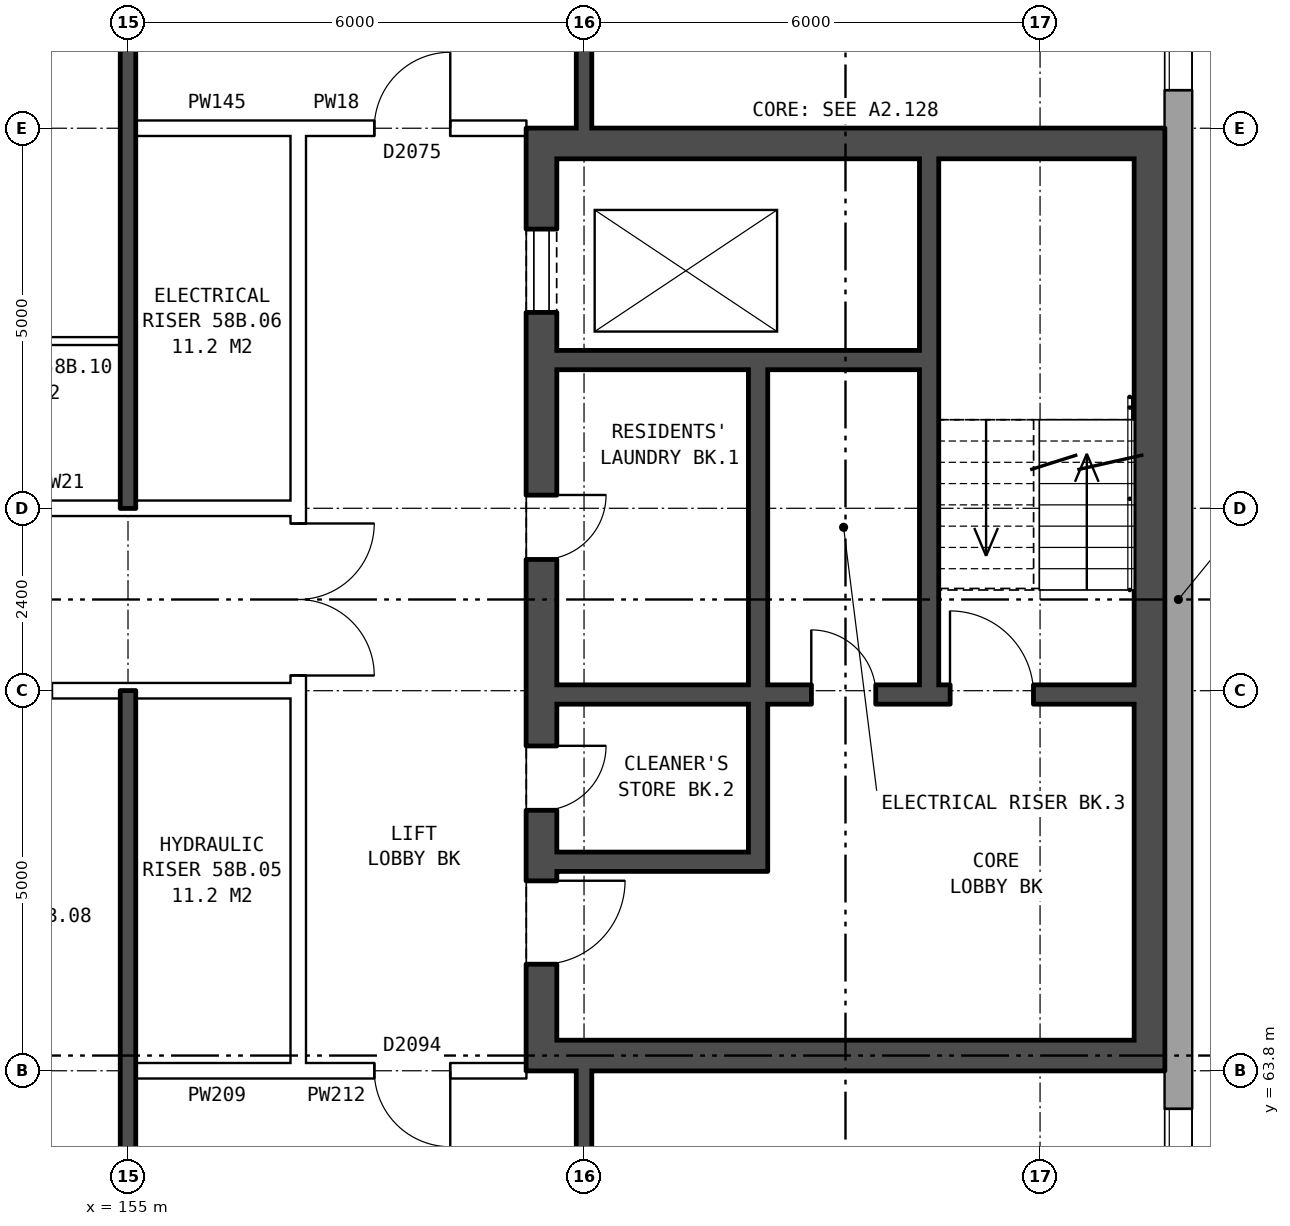
"""IFC4 building model, lengths in metres.
Left out: names, types, materials, properties, quantities, classifications, styles, units other than length and angle.
Written with IfcOpenShell. Run it as: python <this file> out.ifc"""

import sys

from ifc_helpers import new_model, si_unit, direction, frame, frame_2d, origin, place, context, subcontext, project, spatial, rectangle, extrude, element, fill, save


model = new_model("IFC4")
c1 = context("Model", 3, precision=1e-05, world=origin(), true_north=direction((0.0, 1.0)))
c2 = subcontext(c1, "Body", "Model", "MODEL_VIEW")
j1 = project(units=[si_unit("LENGTHUNIT", "METRE"), si_unit("PLANEANGLEUNIT", "RADIAN")], contexts=[c1])
p1 = place(None, origin())
s1 = spatial("IfcSite", under=j1, at=p1, CompositionType="ELEMENT")
p2 = place(p1, origin())
s2 = spatial("IfcBuilding", under=s1, at=p2, CompositionType="ELEMENT")
p3 = place(p2, frame((0.0, 0.0, 205.9)))
s3 = spatial("IfcBuildingStorey", under=s2, at=p3, CompositionType="ELEMENT", Elevation=205.9)
p4 = place(p3, frame((168.82, 57.075, 0.0), z_axis=(0.0, 0.0, 1.0), x_axis=(0.0, 1.0, 0.0)))
e1 = element("IfcWall", 1, at=p4, inside=s3, PredefinedType="STANDARD", context=c2, shape_type="SweptSolid", body=[
    extrude(rectangle(XDim=25.851, YDim=0.36, at=frame_2d((12.925, 0.0))), origin(), (0.0, 0.0, 1.0), 2.85),
])
p5 = place(p4, frame((2.225, 0.0, 0.8)))
e2 = element("IfcOpeningElement", 2, at=p5, cuts=e1, PredefinedType="OPENING", context=c2, shape_type="SweptSolid", body=[
    extrude(rectangle(XDim=0.6, YDim=0.9, at=frame_2d((0.3, 0.45))), frame((0.0, 0.19, 0.0), z_axis=(0.0, -1.0, 0.0), x_axis=(1.0, 0.0, 0.0)), (0.0, 0.0, 1.0), 0.38),
])
p6 = place(p4, frame((4.625, 0.0, 0.8)))
e3 = element("IfcOpeningElement", 3, at=p6, cuts=e1, PredefinedType="OPENING", context=c2, shape_type="SweptSolid", body=[
    extrude(rectangle(XDim=1.6, YDim=1.8, at=frame_2d((0.8, 0.9))), frame((0.0, 0.19, 0.0), z_axis=(0.0, -1.0, 0.0), x_axis=(1.0, 0.0, 0.0)), (0.0, 0.0, 1.0), 0.38),
])
p7 = place(p4, frame((19.625, 0.0, 0.8)))
e4 = element("IfcOpeningElement", 4, at=p7, cuts=e1, PredefinedType="OPENING", context=c2, shape_type="SweptSolid", body=[
    extrude(rectangle(XDim=1.6, YDim=1.8, at=frame_2d((0.8, 0.9))), frame((0.0, 0.19, 0.0), z_axis=(0.0, -1.0, 0.0), x_axis=(1.0, 0.0, 0.0)), (0.0, 0.0, 1.0), 0.38),
])
p8 = place(p4, frame((21.525, 0.0, 0.8)))
e5 = element("IfcOpeningElement", 5, at=p8, cuts=e1, PredefinedType="OPENING", context=c2, shape_type="SweptSolid", body=[
    extrude(rectangle(XDim=1.2, YDim=1.8, at=frame_2d((0.6, 0.9))), frame((0.0, 0.19, 0.0), z_axis=(0.0, -1.0, 0.0), x_axis=(1.0, 0.0, 0.0)), (0.0, 0.0, 1.0), 0.38),
])
p9 = place(p4, frame((3.125, 0.0, 0.8)))
e6 = element("IfcOpeningElement", 6, at=p9, cuts=e1, PredefinedType="OPENING", context=c2, shape_type="SweptSolid", body=[
    extrude(rectangle(XDim=1.2, YDim=1.8, at=frame_2d((0.6, 0.9))), frame((0.0, 0.19, 0.0), z_axis=(0.0, -1.0, 0.0), x_axis=(1.0, 0.0, 0.0)), (0.0, 0.0, 1.0), 0.38),
])
p10 = place(p4, frame((23.025, 0.0, 0.8)))
e7 = element("IfcOpeningElement", 7, at=p10, cuts=e1, PredefinedType="OPENING", context=c2, shape_type="SweptSolid", body=[
    extrude(rectangle(XDim=0.6, YDim=0.9, at=frame_2d((0.3, 0.45))), frame((0.0, 0.19, 0.0), z_axis=(0.0, -1.0, 0.0), x_axis=(1.0, 0.0, 0.0)), (0.0, 0.0, 1.0), 0.38),
])
p11 = place(p3, frame((160.44, 76.2, 0.0), z_axis=(0.0, 0.0, 1.0), x_axis=(0.0, -1.0, 0.0)))
e8 = element("IfcWall", 8, at=p11, inside=s3, PredefinedType="SHEAR", context=c2, shape_type="SweptSolid", body=[
    extrude(rectangle(XDim=12.4, YDim=0.4, at=frame_2d((6.2, 0.0))), origin(), (0.0, 0.0, 1.0), 2.85),
])
p12 = place(p11, frame((1.325, 0.0, 0.0)))
e9 = element("IfcOpeningElement", 9, at=p12, cuts=e8, PredefinedType="OPENING", context=c2, shape_type="SweptSolid", body=[
    extrude(rectangle(XDim=1.1, YDim=2.1, at=frame_2d((0.55, 1.05))), frame((0.0, 0.21, 0.0), z_axis=(0.0, -1.0, 0.0), x_axis=(1.0, 0.0, 0.0)), (0.0, 0.0, 1.0), 0.42),
])
p13 = place(p11, frame((4.825, 0.0, 0.0)))
e10 = element("IfcOpeningElement", 10, at=p13, cuts=e8, PredefinedType="OPENING", context=c2, shape_type="SweptSolid", body=[
    extrude(rectangle(XDim=0.85, YDim=2.1, at=frame_2d((0.425, 1.05))), frame((0.0, 0.21, 0.0), z_axis=(0.0, -1.0, 0.0), x_axis=(1.0, 0.0, 0.0)), (0.0, 0.0, 1.0), 0.42),
])
p14 = place(p11, frame((9.9, 0.0, 0.0)))
e11 = element("IfcOpeningElement", 11, at=p14, cuts=e8, PredefinedType="OPENING", context=c2, shape_type="SweptSolid", body=[
    extrude(rectangle(XDim=1.1, YDim=2.1, at=frame_2d((0.55, 1.05))), frame((0.0, 0.21, 0.0), z_axis=(0.0, -1.0, 0.0), x_axis=(1.0, 0.0, 0.0)), (0.0, 0.0, 1.0), 0.42),
])
p15 = place(p11, frame((8.125, 0.0, 0.0)))
e12 = element("IfcOpeningElement", 12, at=p15, cuts=e8, PredefinedType="OPENING", context=c2, shape_type="SweptSolid", body=[
    extrude(rectangle(XDim=0.85, YDim=2.1, at=frame_2d((0.425, 1.05))), frame((0.0, 0.21, 0.0), z_axis=(0.0, -1.0, 0.0), x_axis=(1.0, 0.0, 0.0)), (0.0, 0.0, 1.0), 0.42),
])
p16 = place(p3, frame((168.44, 76.2, 0.0), z_axis=(0.0, 0.0, 1.0), x_axis=(0.0, -1.0, 0.0)))
e13 = element("IfcWall", 13, at=p16, inside=s3, PredefinedType="SHEAR", context=c2, shape_type="SweptSolid", body=[
    extrude(rectangle(XDim=12.4, YDim=0.4, at=frame_2d((6.2, 0.0))), origin(), (0.0, 0.0, 1.0), 2.85),
])
for number, where, z_axis, x_axis in (
    (14, (160.64, 76.0, 0.0), (0.0, 0.0, 1.0), (1.0, 0.0, 0.0)),
    (15, (160.64, 64.0, 0.0), (0.0, 0.0, 1.0), (1.0, 0.0, 0.0)),
):
    element("IfcWall", number, at=place(p3, frame(where, z_axis=z_axis, x_axis=x_axis)), inside=s3, PredefinedType="SHEAR", context=c2, shape_type="SweptSolid", body=[
        extrude(rectangle(XDim=7.6, YDim=0.4, at=frame_2d((3.8, 0.0))), origin(), (0.0, 0.0, 1.0), 2.85),
    ])
p17 = place(p3, frame((160.64, 73.15, 0.0), z_axis=(0.0, 0.0, 1.0), x_axis=(1.0, 0.0, 0.0)))
e16 = element("IfcWall", 16, at=p17, inside=s3, PredefinedType="SHEAR", context=c2, shape_type="SweptSolid", body=[
    extrude(rectangle(XDim=4.775, YDim=0.25, at=frame_2d((2.388, 0.0))), origin(), (0.0, 0.0, 1.0), 2.85),
])
p18 = place(p3, frame((160.64, 68.75, 0.0), z_axis=(0.0, 0.0, 1.0), x_axis=(1.0, 0.0, 0.0)))
e17 = element("IfcWall", 17, at=p18, inside=s3, PredefinedType="SHEAR", context=c2, shape_type="SweptSolid", body=[
    extrude(rectangle(XDim=7.6, YDim=0.25, at=frame_2d((3.8, 0.0))), origin(), (0.0, 0.0, 1.0), 2.85),
])
p19 = place(p18, frame((5.175, 0.0, 0.0)))
e18 = element("IfcOpeningElement", 18, at=p19, cuts=e17, PredefinedType="OPENING", context=c2, shape_type="SweptSolid", body=[
    extrude(rectangle(XDim=1.1, YDim=2.1, at=frame_2d((0.55, 1.05))), frame((0.0, 0.135, 0.0), z_axis=(0.0, -1.0, 0.0), x_axis=(1.0, 0.0, 0.0)), (0.0, 0.0, 1.0), 0.27),
])
p20 = place(p18, frame((3.35, 0.0, 0.0)))
e19 = element("IfcOpeningElement", 19, at=p20, cuts=e17, PredefinedType="OPENING", context=c2, shape_type="SweptSolid", body=[
    extrude(rectangle(XDim=0.85, YDim=2.1, at=frame_2d((0.425, 1.05))), frame((0.0, 0.135, 0.0), z_axis=(0.0, -1.0, 0.0), x_axis=(1.0, 0.0, 0.0)), (0.0, 0.0, 1.0), 0.27),
])
p21 = place(p3, frame((160.64, 66.55, 0.0), z_axis=(0.0, 0.0, 1.0), x_axis=(1.0, 0.0, 0.0)))
e20 = element("IfcWall", 20, at=p21, inside=s3, PredefinedType="SHEAR", context=c2, shape_type="SweptSolid", body=[
    extrude(rectangle(XDim=2.525, YDim=0.25, at=frame_2d((1.263, 0.0))), origin(), (0.0, 0.0, 1.0), 2.85),
])
p22 = place(p3, frame((163.29, 73.025, 0.0), z_axis=(0.0, 0.0, 1.0), x_axis=(0.0, -1.0, 0.0)))
e21 = element("IfcWall", 21, at=p22, inside=s3, PredefinedType="SHEAR", context=c2, shape_type="SweptSolid", body=[
    extrude(rectangle(XDim=4.15, YDim=0.25, at=frame_2d((2.075, 0.0))), origin(), (0.0, 0.0, 1.0), 2.85),
])
p23 = place(p3, frame((163.29, 68.625, 0.0), z_axis=(0.0, 0.0, 1.0), x_axis=(0.0, -1.0, 0.0)))
e22 = element("IfcWall", 22, at=p23, inside=s3, PredefinedType="SHEAR", context=c2, shape_type="SweptSolid", body=[
    extrude(rectangle(XDim=2.2, YDim=0.25, at=frame_2d((1.1, 0.0))), origin(), (0.0, 0.0, 1.0), 2.85),
])
p24 = place(p3, frame((165.54, 75.8, 0.0), z_axis=(0.0, 0.0, 1.0), x_axis=(0.0, -1.0, 0.0)))
e23 = element("IfcWall", 23, at=p24, inside=s3, PredefinedType="SHEAR", context=c2, shape_type="SweptSolid", body=[
    extrude(rectangle(XDim=6.925, YDim=0.25, at=frame_2d((3.462, 0.0))), origin(), (0.0, 0.0, 1.0), 2.85),
])
p25 = place(p3, frame((157.24, 63.9, 0.0), z_axis=(0.0, 0.0, 1.0), x_axis=(0.0, 1.0, 0.0)))
e24 = element("IfcWall", 24, at=p25, inside=s3, PredefinedType="PARTITIONING", context=c2, shape_type="SweptSolid", body=[
    extrude(rectangle(XDim=12.2, YDim=0.2, at=frame_2d((6.1, 0.0))), origin(), (0.0, 0.0, 1.0), 2.85),
])
p26 = place(p25, frame((5.1, 0.0, 0.0)))
e25 = element("IfcOpeningElement", 25, at=p26, cuts=e24, PredefinedType="OPENING", context=c2, shape_type="SweptSolid", body=[
    extrude(rectangle(XDim=2.0, YDim=2.1, at=frame_2d((1.0, 1.05))), frame((0.0, 0.11, 0.0), z_axis=(0.0, -1.0, 0.0), x_axis=(1.0, 0.0, 0.0)), (0.0, 0.0, 1.0), 0.22),
])
p27 = place(p3, frame((155.1, 63.8, 0.0), z_axis=(0.0, 0.0, 1.0), x_axis=(1.0, 0.0, 0.0)))
e26 = element("IfcWall", 26, at=p27, inside=s3, PredefinedType="PARTITIONING", context=c2, shape_type="SweptSolid", body=[
    extrude(rectangle(XDim=2.14, YDim=0.2, at=frame_2d((1.07, 0.0))), origin(), (0.0, 0.0, 1.0), 2.85),
])
p28 = place(p3, frame((157.24, 63.8, 0.0), z_axis=(0.0, 0.0, 1.0), x_axis=(1.0, 0.0, 0.0)))
e27 = element("IfcWall", 27, at=p28, inside=s3, PredefinedType="PARTITIONING", context=c2, shape_type="SweptSolid", body=[
    extrude(rectangle(XDim=3.0, YDim=0.2, at=frame_2d((1.5, 0.0))), origin(), (0.0, 0.0, 1.0), 2.85),
])
p29 = place(p28, frame((1.0, 0.0, 0.0)))
e28 = element("IfcOpeningElement", 28, at=p29, cuts=e27, PredefinedType="OPENING", context=c2, shape_type="SweptSolid", body=[
    extrude(rectangle(XDim=1.0, YDim=2.1, at=frame_2d((0.5, 1.05))), frame((0.0, 0.11, 0.0), z_axis=(0.0, -1.0, 0.0), x_axis=(1.0, 0.0, 0.0)), (0.0, 0.0, 1.0), 0.22),
])
p30 = place(p3, frame((142.76, 68.8, 0.0), z_axis=(0.0, 0.0, 1.0), x_axis=(1.0, 0.0, 0.0)))
e29 = element("IfcWall", 29, at=p30, inside=s3, PredefinedType="PARTITIONING", context=c2, shape_type="SweptSolid", body=[
    extrude(rectangle(XDim=14.48, YDim=0.2, at=frame_2d((7.24, 0.0))), origin(), (0.0, 0.0, 1.0), 2.85),
])
p31 = place(p30, frame((1.12, 0.0, 0.0)))
e30 = element("IfcOpeningElement", 30, at=p31, cuts=e29, PredefinedType="OPENING", context=c2, shape_type="SweptSolid", body=[
    extrude(rectangle(XDim=1.0, YDim=2.1, at=frame_2d((0.5, 1.05))), frame((0.0, 0.11, 0.0), z_axis=(0.0, -1.0, 0.0), x_axis=(1.0, 0.0, 0.0)), (0.0, 0.0, 1.0), 0.22),
])
p32 = place(p30, frame((10.24, 0.0, 0.0)))
e31 = element("IfcOpeningElement", 31, at=p32, cuts=e29, PredefinedType="OPENING", context=c2, shape_type="SweptSolid", body=[
    extrude(rectangle(XDim=1.0, YDim=2.1, at=frame_2d((0.5, 1.05))), frame((0.0, 0.11, 0.0), z_axis=(0.0, -1.0, 0.0), x_axis=(1.0, 0.0, 0.0)), (0.0, 0.0, 1.0), 0.22),
])
p33 = place(p3, frame((142.76, 71.2, 0.0), z_axis=(0.0, 0.0, 1.0), x_axis=(1.0, 0.0, 0.0)))
e32 = element("IfcWall", 32, at=p33, inside=s3, PredefinedType="PARTITIONING", context=c2, shape_type="SweptSolid", body=[
    extrude(rectangle(XDim=14.48, YDim=0.2, at=frame_2d((7.24, 0.0))), origin(), (0.0, 0.0, 1.0), 2.85),
])
p34 = place(p33, frame((1.12, 0.0, 0.0)))
e33 = element("IfcOpeningElement", 33, at=p34, cuts=e32, PredefinedType="OPENING", context=c2, shape_type="SweptSolid", body=[
    extrude(rectangle(XDim=1.0, YDim=2.1, at=frame_2d((0.5, 1.05))), frame((0.0, 0.11, 0.0), z_axis=(0.0, -1.0, 0.0), x_axis=(1.0, 0.0, 0.0)), (0.0, 0.0, 1.0), 0.22),
])
p35 = place(p33, frame((7.24, 0.0, 0.0)))
e34 = element("IfcOpeningElement", 34, at=p35, cuts=e32, PredefinedType="OPENING", context=c2, shape_type="SweptSolid", body=[
    extrude(rectangle(XDim=1.0, YDim=2.1, at=frame_2d((0.5, 1.05))), frame((0.0, 0.11, 0.0), z_axis=(0.0, -1.0, 0.0), x_axis=(1.0, 0.0, 0.0)), (0.0, 0.0, 1.0), 0.22),
])
p36 = place(p3, frame((152.0, 73.4, 0.0), z_axis=(0.0, 0.0, 1.0), x_axis=(1.0, 0.0, 0.0)))
e35 = element("IfcWall", 35, at=p36, inside=s3, PredefinedType="PARTITIONING", context=c2, shape_type="SweptSolid", body=[
    extrude(rectangle(XDim=2.9, YDim=0.1, at=frame_2d((1.45, 0.0))), origin(), (0.0, 0.0, 1.0), 2.85),
])
p37 = place(p3, frame((155.1, 76.2, 0.0), z_axis=(0.0, 0.0, 1.0), x_axis=(1.0, 0.0, 0.0)))
e36 = element("IfcWall", 36, at=p37, inside=s3, PredefinedType="PARTITIONING", context=c2, shape_type="SweptSolid", body=[
    extrude(rectangle(XDim=2.14, YDim=0.2, at=frame_2d((1.07, 0.0))), origin(), (0.0, 0.0, 1.0), 2.85),
])
p38 = place(p3, frame((157.24, 76.2, 0.0), z_axis=(0.0, 0.0, 1.0), x_axis=(1.0, 0.0, 0.0)))
e37 = element("IfcWall", 37, at=p38, inside=s3, PredefinedType="PARTITIONING", context=c2, shape_type="SweptSolid", body=[
    extrude(rectangle(XDim=3.0, YDim=0.2, at=frame_2d((1.5, 0.0))), origin(), (0.0, 0.0, 1.0), 2.85),
])
p39 = place(p38, frame((1.0, 0.0, 0.0)))
e38 = element("IfcOpeningElement", 38, at=p39, cuts=e37, PredefinedType="OPENING", context=c2, shape_type="SweptSolid", body=[
    extrude(rectangle(XDim=1.0, YDim=2.1, at=frame_2d((0.5, 1.05))), frame((0.0, 0.11, 0.0), z_axis=(0.0, -1.0, 0.0), x_axis=(1.0, 0.0, 0.0)), (0.0, 0.0, 1.0), 0.22),
])
for number, where, z_axis, x_axis in (
    (39, (155.0, 54.36, 0.0), (0.0, 0.0, 1.0), (0.0, 1.0, 0.0)),
    (40, (155.0, 71.2, 0.0), (0.0, 0.0, 1.0), (0.0, 1.0, 0.0)),
):
    element("IfcWall", number, at=place(p3, frame(where, z_axis=z_axis, x_axis=x_axis)), inside=s3, PredefinedType="SOLIDWALL", context=c2, shape_type="SweptSolid", body=[
        extrude(rectangle(XDim=14.44, YDim=0.2, at=frame_2d((7.22, 0.0))), origin(), (0.0, 0.0, 1.0), 2.85),
    ])
p40 = place(p3, frame((161.0, 54.36, 0.0), z_axis=(0.0, 0.0, 1.0), x_axis=(0.0, 1.0, 0.0)))
e41 = element("IfcWall", 41, at=p40, inside=s3, PredefinedType="SOLIDWALL", context=c2, shape_type="SweptSolid", body=[
    extrude(rectangle(XDim=9.44, YDim=0.2, at=frame_2d((4.72, 0.0))), origin(), (0.0, 0.0, 1.0), 2.85),
])
p41 = place(p40, frame((7.19, 0.0, 0.0)))
e42 = element("IfcOpeningElement", 42, at=p41, cuts=e41, PredefinedType="OPENING", context=c2, shape_type="SweptSolid", body=[
    extrude(rectangle(XDim=0.9, YDim=2.1, at=frame_2d((0.45, 1.05))), frame((0.0, 0.11, 0.0), z_axis=(0.0, -1.0, 0.0), x_axis=(1.0, 0.0, 0.0)), (0.0, 0.0, 1.0), 0.22),
])
p42 = place(p3, frame((161.0, 76.2, 0.0), z_axis=(0.0, 0.0, 1.0), x_axis=(0.0, 1.0, 0.0)))
e43 = element("IfcWall", 43, at=p42, inside=s3, PredefinedType="SOLIDWALL", context=c2, shape_type="SweptSolid", body=[
    extrude(rectangle(XDim=9.44, YDim=0.2, at=frame_2d((4.72, 0.0))), origin(), (0.0, 0.0, 1.0), 2.85),
])
p43 = place(p42, frame((1.35, 0.0, 0.0)))
e44 = element("IfcOpeningElement", 44, at=p43, cuts=e43, PredefinedType="OPENING", context=c2, shape_type="SweptSolid", body=[
    extrude(rectangle(XDim=0.9, YDim=2.1, at=frame_2d((0.45, 1.05))), frame((0.0, 0.11, 0.0), z_axis=(0.0, -1.0, 0.0), x_axis=(1.0, 0.0, 0.0)), (0.0, 0.0, 1.0), 0.22),
])
p44 = place(p6, origin())
e45 = element("IfcWindow", 45, at=p44, inside=s3, PartitioningType="SINGLE_PANEL", PredefinedType="WINDOW", context=c2, shape_type="SweptSolid", body=[
    extrude(rectangle(XDim=1.6, YDim=1.8, at=frame_2d((0.8, 0.9))), frame((0.0, 0.15, 0.0), z_axis=(0.0, -1.0, 0.0), x_axis=(1.0, 0.0, 0.0)), (0.0, 0.0, 1.0), 0.06),
])
fill(e3, e45)
p45 = place(p7, origin())
e46 = element("IfcWindow", 46, at=p45, inside=s3, PartitioningType="SINGLE_PANEL", PredefinedType="WINDOW", context=c2, shape_type="SweptSolid", body=[
    extrude(rectangle(XDim=1.6, YDim=1.8, at=frame_2d((0.8, 0.9))), frame((0.0, 0.15, 0.0), z_axis=(0.0, -1.0, 0.0), x_axis=(1.0, 0.0, 0.0)), (0.0, 0.0, 1.0), 0.06),
])
fill(e4, e46)
p46 = place(p12, origin())
e47 = element("IfcDoor", 47, at=p46, inside=s3, OperationType="DOUBLE_DOOR_SLIDING", PredefinedType="DOOR", context=c2, shape_type="SweptSolid", body=[
    extrude(rectangle(XDim=1.1, YDim=2.1, at=frame_2d((0.55, 1.05))), frame((0.0, 0.185, 0.0), z_axis=(0.0, -1.0, 0.0), x_axis=(1.0, 0.0, 0.0)), (0.0, 0.0, 1.0), 0.05),
])
fill(e9, e47)
p47 = place(p13, origin())
e48 = element("IfcDoor", 48, at=p47, inside=s3, OperationType="SINGLE_SWING_LEFT", PredefinedType="DOOR", context=c2, shape_type="SweptSolid", body=[
    extrude(rectangle(XDim=0.85, YDim=2.1, at=frame_2d((0.425, 1.05))), frame((0.0, 0.185, 0.0), z_axis=(0.0, -1.0, 0.0), x_axis=(1.0, 0.0, 0.0)), (0.0, 0.0, 1.0), 0.05),
])
fill(e10, e48)
p48 = place(p14, origin())
e49 = element("IfcDoor", 49, at=p48, inside=s3, OperationType="SINGLE_SWING_LEFT", PredefinedType="DOOR", context=c2, shape_type="SweptSolid", body=[
    extrude(rectangle(XDim=1.1, YDim=2.1, at=frame_2d((0.55, 1.05))), frame((0.0, 0.185, 0.0), z_axis=(0.0, -1.0, 0.0), x_axis=(1.0, 0.0, 0.0)), (0.0, 0.0, 1.0), 0.05),
])
fill(e11, e49)
p49 = place(p19, origin())
e50 = element("IfcDoor", 50, at=p49, inside=s3, OperationType="SINGLE_SWING_LEFT", PredefinedType="DOOR", context=c2, shape_type="SweptSolid", body=[
    extrude(rectangle(XDim=1.1, YDim=2.1, at=frame_2d((0.55, 1.05))), frame((0.0, 0.025, 0.0), z_axis=(0.0, -1.0, 0.0), x_axis=(1.0, 0.0, 0.0)), (0.0, 0.0, 1.0), 0.05),
])
fill(e18, e50)
p50 = place(p15, origin())
e51 = element("IfcDoor", 51, at=p50, inside=s3, OperationType="SINGLE_SWING_LEFT", PredefinedType="DOOR", context=c2, shape_type="SweptSolid", body=[
    extrude(rectangle(XDim=0.85, YDim=2.1, at=frame_2d((0.425, 1.05))), frame((0.0, 0.185, 0.0), z_axis=(0.0, -1.0, 0.0), x_axis=(1.0, 0.0, 0.0)), (0.0, 0.0, 1.0), 0.05),
])
fill(e12, e51)
p51 = place(p20, origin())
e52 = element("IfcDoor", 52, at=p51, inside=s3, OperationType="SINGLE_SWING_LEFT", PredefinedType="DOOR", context=c2, shape_type="SweptSolid", body=[
    extrude(rectangle(XDim=0.85, YDim=2.1, at=frame_2d((0.425, 1.05))), frame((0.0, 0.025, 0.0), z_axis=(0.0, -1.0, 0.0), x_axis=(1.0, 0.0, 0.0)), (0.0, 0.0, 1.0), 0.05),
])
fill(e19, e52)
p52 = place(p26, frame((2.0, 0.0, 0.0), z_axis=(0.0, 0.0, 1.0), x_axis=(-1.0, 0.0, 0.0)))
e53 = element("IfcDoor", 53, at=p52, inside=s3, OperationType="DOUBLE_DOOR_SINGLE_SWING", PredefinedType="DOOR", context=c2, shape_type="SweptSolid", body=[
    extrude(rectangle(XDim=2.0, YDim=2.1, at=frame_2d((1.0, 1.05))), frame((0.0, 0.025, 0.0), z_axis=(0.0, -1.0, 0.0), x_axis=(1.0, 0.0, 0.0)), (0.0, 0.0, 1.0), 0.05),
])
fill(e25, e53)
p53 = place(p29, frame((1.0, 0.0, 0.0), z_axis=(0.0, 0.0, 1.0), x_axis=(-1.0, 0.0, 0.0)))
e54 = element("IfcDoor", 54, at=p53, inside=s3, OperationType="SINGLE_SWING_LEFT", PredefinedType="DOOR", context=c2, shape_type="SweptSolid", body=[
    extrude(rectangle(XDim=1.0, YDim=2.1, at=frame_2d((0.5, 1.05))), frame((0.0, 0.025, 0.0), z_axis=(0.0, -1.0, 0.0), x_axis=(1.0, 0.0, 0.0)), (0.0, 0.0, 1.0), 0.05),
])
fill(e28, e54)
p54 = place(p39, origin())
e55 = element("IfcDoor", 55, at=p54, inside=s3, OperationType="SINGLE_SWING_RIGHT", PredefinedType="DOOR", context=c2, shape_type="SweptSolid", body=[
    extrude(rectangle(XDim=1.0, YDim=2.1, at=frame_2d((0.5, 1.05))), frame((0.0, 0.025, 0.0), z_axis=(0.0, -1.0, 0.0), x_axis=(1.0, 0.0, 0.0)), (0.0, 0.0, 1.0), 0.05),
])
fill(e38, e55)
save(model, sys.argv[1])
